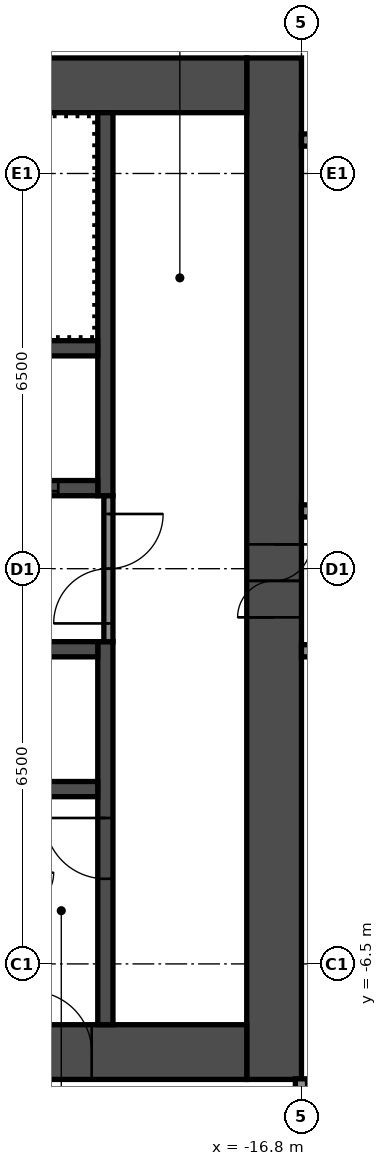
"""IFC4 building model, lengths in metres.
Left out: names, types, materials, properties, quantities, classifications, styles, units other than length and angle.
Written with IfcOpenShell. Run it as: python <this file> out.ifc"""

import sys

from ifc_helpers import new_model, si_unit, direction, frame, frame_2d, origin, place, context, subcontext, project, spatial, rectangle, extrude, element, fill, save


model = new_model("IFC4")
c1 = context("Model", 3, precision=1e-05, world=origin(), true_north=direction((0.0, 1.0)))
c2 = subcontext(c1, "Body", "Model", "MODEL_VIEW")
j1 = project(units=[si_unit("LENGTHUNIT", "METRE"), si_unit("PLANEANGLEUNIT", "RADIAN")], contexts=[c1])
p1 = place(None, origin())
s1 = spatial("IfcSite", under=j1, at=p1, CompositionType="ELEMENT")
p2 = place(p1, origin())
s2 = spatial("IfcBuilding", under=s1, at=p2, CompositionType="ELEMENT")
p3 = place(p2, frame((0.0, 0.0, 91.4)))
s3 = spatial("IfcBuildingStorey", under=s2, at=p3, CompositionType="ELEMENT", Elevation=91.4)
p4 = place(p3, frame((-17.25, -8.4, 0.0), z_axis=(0.0, 0.0, 1.0), x_axis=(0.0, 1.0, 0.0)))
e1 = element("IfcWall", 1, at=p4, inside=s3, PredefinedType="SHEAR", context=c2, shape_type="SweptSolid", body=[
    extrude(rectangle(XDim=16.8, YDim=0.9, at=frame_2d((8.4, 0.0))), origin(), (0.0, 0.0, 1.0), 2.8),
])
p5 = place(p4, frame((7.6, 0.0, 0.0)))
e2 = element("IfcOpeningElement", 2, at=p5, cuts=e1, PredefinedType="OPENING", context=c2, shape_type="SweptSolid", body=[
    extrude(rectangle(XDim=1.2, YDim=2.1, at=frame_2d((0.6, 1.05))), frame((0.0, 0.46, 0.0), z_axis=(0.0, -1.0, 0.0), x_axis=(1.0, 0.0, 0.0)), (0.0, 0.0, 1.0), 0.92),
])
p6 = place(p3, frame((-32.7, 7.95, 0.0), z_axis=(0.0, 0.0, 1.0), x_axis=(1.0, 0.0, 0.0)))
e3 = element("IfcWall", 3, at=p6, inside=s3, PredefinedType="SHEAR", context=c2, shape_type="SweptSolid", body=[
    extrude(rectangle(XDim=15.0, YDim=0.9, at=frame_2d((7.5, 0.0))), origin(), (0.0, 0.0, 1.0), 2.8),
])
p7 = place(p6, frame((3.4, 0.0, 0.0)))
e4 = element("IfcOpeningElement", 4, at=p7, cuts=e3, PredefinedType="OPENING", context=c2, shape_type="SweptSolid", body=[
    extrude(rectangle(XDim=1.2, YDim=2.1, at=frame_2d((0.6, 1.05))), frame((0.0, 0.46, 0.0), z_axis=(0.0, -1.0, 0.0), x_axis=(1.0, 0.0, 0.0)), (0.0, 0.0, 1.0), 0.92),
])
p8 = place(p6, frame((0.75, 0.0, 0.0)))
e5 = element("IfcOpeningElement", 5, at=p8, cuts=e3, PredefinedType="OPENING", context=c2, shape_type="SweptSolid", body=[
    extrude(rectangle(XDim=0.9, YDim=2.1, at=frame_2d((0.45, 1.05))), frame((0.0, 0.46, 0.0), z_axis=(0.0, -1.0, 0.0), x_axis=(1.0, 0.0, 0.0)), (0.0, 0.0, 1.0), 0.92),
])
p9 = place(p3, frame((-32.7, -7.95, 0.0), z_axis=(0.0, 0.0, 1.0), x_axis=(1.0, 0.0, 0.0)))
e6 = element("IfcWall", 6, at=p9, inside=s3, PredefinedType="SHEAR", context=c2, shape_type="SweptSolid", body=[
    extrude(rectangle(XDim=15.0, YDim=0.9, at=frame_2d((7.5, 0.0))), origin(), (0.0, 0.0, 1.0), 2.8),
])
p10 = place(p9, frame((11.45, 0.0, 0.0)))
e7 = element("IfcOpeningElement", 7, at=p10, cuts=e6, PredefinedType="OPENING", context=c2, shape_type="SweptSolid", body=[
    extrude(rectangle(XDim=1.0, YDim=2.1, at=frame_2d((0.5, 1.05))), frame((0.0, 0.46, 0.0), z_axis=(0.0, -1.0, 0.0), x_axis=(1.0, 0.0, 0.0)), (0.0, 0.0, 1.0), 0.92),
])
p11 = place(p3, frame((-20.025, 1.2, 0.0), z_axis=(0.0, 0.0, 1.0), x_axis=(0.0, 1.0, 0.0)))
e8 = element("IfcWall", 8, at=p11, inside=s3, PredefinedType="SHEAR", context=c2, shape_type="SweptSolid", body=[
    extrude(rectangle(XDim=6.3, YDim=0.25, at=frame_2d((3.15, 0.0))), origin(), (0.0, 0.0, 1.0), 2.8),
])
p12 = place(p3, frame((-20.025, -7.5, 0.0), z_axis=(0.0, 0.0, 1.0), x_axis=(0.0, 1.0, 0.0)))
e9 = element("IfcWall", 9, at=p12, inside=s3, PredefinedType="SHEAR", context=c2, shape_type="SweptSolid", body=[
    extrude(rectangle(XDim=6.3, YDim=0.25, at=frame_2d((3.15, 0.0))), origin(), (0.0, 0.0, 1.0), 2.8),
])
p13 = place(p12, frame((2.4, 0.0, 0.0)))
e10 = element("IfcOpeningElement", 10, at=p13, cuts=e9, PredefinedType="OPENING", context=c2, shape_type="SweptSolid", body=[
    extrude(rectangle(XDim=1.0, YDim=2.1, at=frame_2d((0.5, 1.05))), frame((0.0, 0.135, 0.0), z_axis=(0.0, -1.0, 0.0), x_axis=(1.0, 0.0, 0.0)), (0.0, 0.0, 1.0), 0.27),
])
p14 = place(p3, frame((-27.65, 1.325, 0.0), z_axis=(0.0, 0.0, 1.0), x_axis=(1.0, 0.0, 0.0)))
e11 = element("IfcWall", 11, at=p14, inside=s3, PredefinedType="SHEAR", context=c2, shape_type="SweptSolid", body=[
    extrude(rectangle(XDim=7.5, YDim=0.25, at=frame_2d((3.75, 0.0))), origin(), (0.0, 0.0, 1.0), 2.8),
])
p15 = place(p14, frame((5.75, 0.0, 0.0)))
e12 = element("IfcOpeningElement", 12, at=p15, cuts=e11, PredefinedType="OPENING", context=c2, shape_type="SweptSolid", body=[
    extrude(rectangle(XDim=1.1, YDim=2.1, at=frame_2d((0.55, 1.05))), frame((0.0, 0.135, 0.0), z_axis=(0.0, -1.0, 0.0), x_axis=(1.0, 0.0, 0.0)), (0.0, 0.0, 1.0), 0.27),
])
p16 = place(p14, frame((3.35, 0.0, 0.0)))
e13 = element("IfcOpeningElement", 13, at=p16, cuts=e11, PredefinedType="OPENING", context=c2, shape_type="SweptSolid", body=[
    extrude(rectangle(XDim=1.1, YDim=2.1, at=frame_2d((0.55, 1.05))), frame((0.0, 0.135, 0.0), z_axis=(0.0, -1.0, 0.0), x_axis=(1.0, 0.0, 0.0)), (0.0, 0.0, 1.0), 0.27),
])
p17 = place(p14, frame((0.95, 0.0, 0.0)))
e14 = element("IfcOpeningElement", 14, at=p17, cuts=e11, PredefinedType="OPENING", context=c2, shape_type="SweptSolid", body=[
    extrude(rectangle(XDim=1.1, YDim=2.1, at=frame_2d((0.55, 1.05))), frame((0.0, 0.135, 0.0), z_axis=(0.0, -1.0, 0.0), x_axis=(1.0, 0.0, 0.0)), (0.0, 0.0, 1.0), 0.27),
])
for number, where, z_axis, x_axis in (
    (15, (-27.65, 3.625, 0.0), (0.0, 0.0, 1.0), (1.0, 0.0, 0.0)),
    (16, (-27.65, -1.325, 0.0), (0.0, 0.0, 1.0), (1.0, 0.0, 0.0)),
    (17, (-27.65, -3.625, 0.0), (0.0, 0.0, 1.0), (1.0, 0.0, 0.0)),
):
    element("IfcWall", number, at=place(p3, frame(where, z_axis=z_axis, x_axis=x_axis)), inside=s3, PredefinedType="SHEAR", context=c2, shape_type="SweptSolid", body=[
        extrude(rectangle(XDim=7.5, YDim=0.25, at=frame_2d((3.75, 0.0))), origin(), (0.0, 0.0, 1.0), 2.8),
    ])
p18 = place(p3, frame((-19.975, -1.2, 0.0), z_axis=(0.0, 0.0, 1.0), x_axis=(0.0, 1.0, 0.0)))
e18 = element("IfcWall", 18, at=p18, inside=s3, PredefinedType="PARTITIONING", context=c2, shape_type="SweptSolid", body=[
    extrude(rectangle(XDim=2.4, YDim=0.15, at=frame_2d((1.2, 0.0))), origin(), (0.0, 0.0, 1.0), 2.8),
])
p19 = place(p18, frame((0.3, 0.0, 0.0)))
e19 = element("IfcOpeningElement", 19, at=p19, cuts=e18, PredefinedType="OPENING", context=c2, shape_type="SweptSolid", body=[
    extrude(rectangle(XDim=1.8, YDim=2.1, at=frame_2d((0.9, 1.05))), frame((0.0, 0.085, 0.0), z_axis=(0.0, -1.0, 0.0), x_axis=(1.0, 0.0, 0.0)), (0.0, 0.0, 1.0), 0.17),
])
p20 = place(p3, frame((-16.8, -1.35, 0.0), z_axis=(0.0, 0.0, 1.0), x_axis=(1.0, 0.0, 0.0)))
e20 = element("IfcWall", 20, at=p20, inside=s3, PredefinedType="PARTITIONING", context=c2, shape_type="SweptSolid", body=[
    extrude(rectangle(XDim=33.6, YDim=0.2, at=frame_2d((16.8, 0.0))), origin(), (0.0, 0.0, 1.0), 2.8),
])
p21 = place(p20, frame((2.0, 0.0, 0.0)))
e21 = element("IfcOpeningElement", 21, at=p21, cuts=e20, PredefinedType="OPENING", context=c2, shape_type="SweptSolid", body=[
    extrude(rectangle(XDim=1.0, YDim=2.1, at=frame_2d((0.5, 1.05))), frame((0.0, 0.11, 0.0), z_axis=(0.0, -1.0, 0.0), x_axis=(1.0, 0.0, 0.0)), (0.0, 0.0, 1.0), 0.22),
])
p22 = place(p20, frame((9.545, 0.0, 0.0)))
e22 = element("IfcOpeningElement", 22, at=p22, cuts=e20, PredefinedType="OPENING", context=c2, shape_type="SweptSolid", body=[
    extrude(rectangle(XDim=0.9, YDim=2.1, at=frame_2d((0.45, 1.05))), frame((0.0, 0.11, 0.0), z_axis=(0.0, -1.0, 0.0), x_axis=(1.0, 0.0, 0.0)), (0.0, 0.0, 1.0), 0.22),
])
p23 = place(p20, frame((13.745, 0.0, 0.0)))
e23 = element("IfcOpeningElement", 23, at=p23, cuts=e20, PredefinedType="OPENING", context=c2, shape_type="SweptSolid", body=[
    extrude(rectangle(XDim=0.9, YDim=2.1, at=frame_2d((0.45, 1.05))), frame((0.0, 0.11, 0.0), z_axis=(0.0, -1.0, 0.0), x_axis=(1.0, 0.0, 0.0)), (0.0, 0.0, 1.0), 0.22),
])
p24 = place(p20, frame((18.8, 0.0, 0.0)))
e24 = element("IfcOpeningElement", 24, at=p24, cuts=e20, PredefinedType="OPENING", context=c2, shape_type="SweptSolid", body=[
    extrude(rectangle(XDim=1.0, YDim=2.1, at=frame_2d((0.5, 1.05))), frame((0.0, 0.11, 0.0), z_axis=(0.0, -1.0, 0.0), x_axis=(1.0, 0.0, 0.0)), (0.0, 0.0, 1.0), 0.22),
])
p25 = place(p20, frame((30.6, 0.0, 0.0)))
e25 = element("IfcOpeningElement", 25, at=p25, cuts=e20, PredefinedType="OPENING", context=c2, shape_type="SweptSolid", body=[
    extrude(rectangle(XDim=1.0, YDim=2.1, at=frame_2d((0.5, 1.05))), frame((0.0, 0.11, 0.0), z_axis=(0.0, -1.0, 0.0), x_axis=(1.0, 0.0, 0.0)), (0.0, 0.0, 1.0), 0.22),
])
p26 = place(p3, frame((-16.8, 0.95, 0.0), z_axis=(0.0, 0.0, 1.0), x_axis=(1.0, 0.0, 0.0)))
e26 = element("IfcWall", 26, at=p26, inside=s3, PredefinedType="PARTITIONING", context=c2, shape_type="SweptSolid", body=[
    extrude(rectangle(XDim=33.6, YDim=0.2, at=frame_2d((16.8, 0.0))), origin(), (0.0, 0.0, 1.0), 2.8),
])
p27 = place(p26, frame((10.47, 0.0, 0.0)))
e27 = element("IfcOpeningElement", 27, at=p27, cuts=e26, PredefinedType="OPENING", context=c2, shape_type="SweptSolid", body=[
    extrude(rectangle(XDim=0.9, YDim=2.1, at=frame_2d((0.45, 1.05))), frame((0.0, 0.11, 0.0), z_axis=(0.0, -1.0, 0.0), x_axis=(1.0, 0.0, 0.0)), (0.0, 0.0, 1.0), 0.22),
])
p28 = place(p26, frame((14.67, 0.0, 0.0)))
e28 = element("IfcOpeningElement", 28, at=p28, cuts=e26, PredefinedType="OPENING", context=c2, shape_type="SweptSolid", body=[
    extrude(rectangle(XDim=0.9, YDim=2.1, at=frame_2d((0.45, 1.05))), frame((0.0, 0.11, 0.0), z_axis=(0.0, -1.0, 0.0), x_axis=(1.0, 0.0, 0.0)), (0.0, 0.0, 1.0), 0.22),
])
p29 = place(p26, frame((27.185, 0.0, 0.0)))
e29 = element("IfcOpeningElement", 29, at=p29, cuts=e26, PredefinedType="OPENING", context=c2, shape_type="SweptSolid", body=[
    extrude(rectangle(XDim=0.9, YDim=2.1, at=frame_2d((0.45, 1.05))), frame((0.0, 0.11, 0.0), z_axis=(0.0, -1.0, 0.0), x_axis=(1.0, 0.0, 0.0)), (0.0, 0.0, 1.0), 0.22),
])
p30 = place(p26, frame((31.385, 0.0, 0.0)))
e30 = element("IfcOpeningElement", 30, at=p30, cuts=e26, PredefinedType="OPENING", context=c2, shape_type="SweptSolid", body=[
    extrude(rectangle(XDim=0.9, YDim=2.1, at=frame_2d((0.45, 1.05))), frame((0.0, 0.11, 0.0), z_axis=(0.0, -1.0, 0.0), x_axis=(1.0, 0.0, 0.0)), (0.0, 0.0, 1.0), 0.22),
])
p31 = place(p3, frame((-16.8, 7.05, 0.0), z_axis=(0.0, 0.0, 1.0), x_axis=(1.0, 0.0, 0.0)))
e31 = element("IfcWall", 31, at=p31, inside=s3, PredefinedType="PARTITIONING", context=c2, shape_type="SweptSolid", body=[
    extrude(rectangle(XDim=33.6, YDim=0.2, at=frame_2d((16.8, 0.0))), origin(), (0.0, 0.0, 1.0), 2.8),
])
p32 = place(p31, frame((1.82, 0.0, 0.0)))
e32 = element("IfcOpeningElement", 32, at=p32, cuts=e31, PredefinedType="OPENING", context=c2, shape_type="SweptSolid", body=[
    extrude(rectangle(XDim=0.9, YDim=2.1, at=frame_2d((0.45, 1.05))), frame((0.0, 0.11, 0.0), z_axis=(0.0, -1.0, 0.0), x_axis=(1.0, 0.0, 0.0)), (0.0, 0.0, 1.0), 0.22),
])
p33 = place(p31, frame((6.02, 0.0, 0.0)))
e33 = element("IfcOpeningElement", 33, at=p33, cuts=e31, PredefinedType="OPENING", context=c2, shape_type="SweptSolid", body=[
    extrude(rectangle(XDim=0.9, YDim=2.1, at=frame_2d((0.45, 1.05))), frame((0.0, 0.11, 0.0), z_axis=(0.0, -1.0, 0.0), x_axis=(1.0, 0.0, 0.0)), (0.0, 0.0, 1.0), 0.22),
])
p34 = place(p31, frame((18.955, 0.0, 0.0)))
e34 = element("IfcOpeningElement", 34, at=p34, cuts=e31, PredefinedType="OPENING", context=c2, shape_type="SweptSolid", body=[
    extrude(rectangle(XDim=0.9, YDim=2.1, at=frame_2d((0.45, 1.05))), frame((0.0, 0.11, 0.0), z_axis=(0.0, -1.0, 0.0), x_axis=(1.0, 0.0, 0.0)), (0.0, 0.0, 1.0), 0.22),
])
p35 = place(p31, frame((23.155, 0.0, 0.0)))
e35 = element("IfcOpeningElement", 35, at=p35, cuts=e31, PredefinedType="OPENING", context=c2, shape_type="SweptSolid", body=[
    extrude(rectangle(XDim=0.9, YDim=2.1, at=frame_2d((0.45, 1.05))), frame((0.0, 0.11, 0.0), z_axis=(0.0, -1.0, 0.0), x_axis=(1.0, 0.0, 0.0)), (0.0, 0.0, 1.0), 0.22),
])
p36 = place(p3, frame((-16.8, -15.55, 0.0), z_axis=(0.0, 0.0, 1.0), x_axis=(0.0, 1.0, 0.0)))
e36 = element("IfcWall", 36, at=p36, inside=s3, PredefinedType="PARTITIONING", context=c2, shape_type="SweptSolid", body=[
    extrude(rectangle(XDim=7.16, YDim=0.2, at=frame_2d((3.58, 0.0))), origin(), (0.0, 0.0, 1.0), 2.8),
])
p37 = place(p5, origin())
e37 = element("IfcDoor", 37, at=p37, inside=s3, OperationType="DOUBLE_DOOR_SINGLE_SWING", PredefinedType="DOOR", context=c2, shape_type="SweptSolid", body=[
    extrude(rectangle(XDim=1.2, YDim=2.1, at=frame_2d((0.6, 1.05))), frame((0.0, 0.025, 0.0), z_axis=(0.0, -1.0, 0.0), x_axis=(1.0, 0.0, 0.0)), (0.0, 0.0, 1.0), 0.05),
])
fill(e2, e37)
p38 = place(p10, origin())
e38 = element("IfcDoor", 38, at=p38, inside=s3, OperationType="SINGLE_SWING_RIGHT", PredefinedType="DOOR", context=c2, shape_type="SweptSolid", body=[
    extrude(rectangle(XDim=1.0, YDim=2.1, at=frame_2d((0.5, 1.05))), frame((0.0, 0.025, 0.0), z_axis=(0.0, -1.0, 0.0), x_axis=(1.0, 0.0, 0.0)), (0.0, 0.0, 1.0), 0.05),
])
fill(e7, e38)
p39 = place(p13, origin())
e39 = element("IfcDoor", 39, at=p39, inside=s3, OperationType="SINGLE_SWING_LEFT", PredefinedType="DOOR", context=c2, shape_type="SweptSolid", body=[
    extrude(rectangle(XDim=1.0, YDim=2.1, at=frame_2d((0.5, 1.05))), frame((0.0, 0.025, 0.0), z_axis=(0.0, -1.0, 0.0), x_axis=(1.0, 0.0, 0.0)), (0.0, 0.0, 1.0), 0.05),
])
fill(e10, e39)
p40 = place(p19, origin())
e40 = element("IfcDoor", 40, at=p40, inside=s3, OperationType="DOUBLE_DOOR_SINGLE_SWING", PredefinedType="DOOR", context=c2, shape_type="SweptSolid", body=[
    extrude(rectangle(XDim=1.8, YDim=2.1, at=frame_2d((0.9, 1.05))), frame((0.0, 0.025, 0.0), z_axis=(0.0, -1.0, 0.0), x_axis=(1.0, 0.0, 0.0)), (0.0, 0.0, 1.0), 0.05),
])
fill(e19, e40)
p41 = place(p15, origin())
e41 = element("IfcDoor", 41, at=p41, inside=s3, OperationType="DOUBLE_DOOR_SLIDING", PredefinedType="DOOR", context=c2, shape_type="SweptSolid", body=[
    extrude(rectangle(XDim=1.1, YDim=2.1, at=frame_2d((0.55, 1.05))), frame((0.0, 0.025, 0.0), z_axis=(0.0, -1.0, 0.0), x_axis=(1.0, 0.0, 0.0)), (0.0, 0.0, 1.0), 0.05),
])
fill(e12, e41)
save(model, sys.argv[1])
